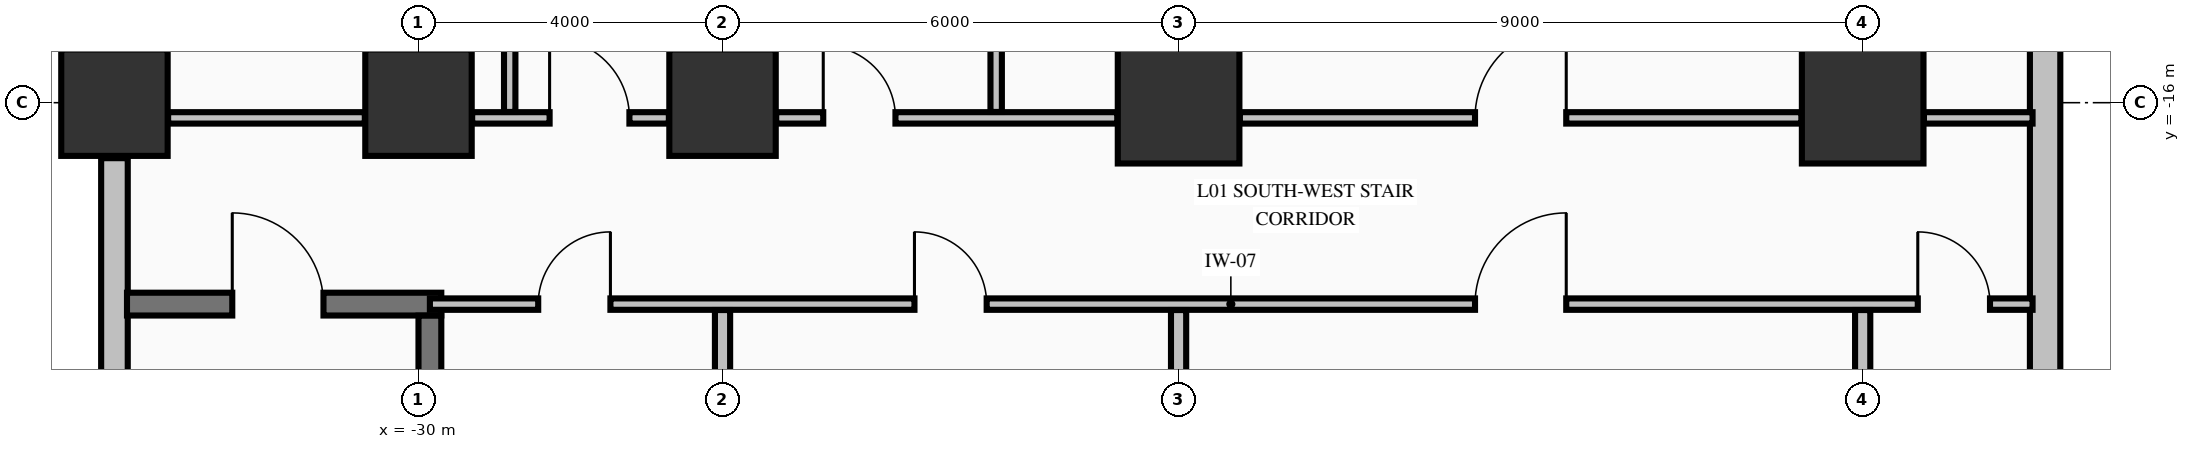
"""IFC4 building model, lengths in metres.
Left out: names, types, materials, properties, quantities, classifications, styles, units other than length and angle.
Written with IfcOpenShell. Run it as: python <this file> out.ifc"""

import sys

from ifc_helpers import new_model, si_unit, direction, frame, frame_2d, origin, origin_2d, place, context, subcontext, project, spatial, rectangle, extrude, element, fill, save


model = new_model("IFC4")
c1 = context("Model", 3, precision=1e-05, world=origin(), true_north=direction((0.0, 1.0)))
c2 = subcontext(c1, "Body", "Model", "MODEL_VIEW")
j1 = project(units=[si_unit("LENGTHUNIT", "METRE"), si_unit("PLANEANGLEUNIT", "RADIAN")], contexts=[c1])
p1 = place(None, origin())
s1 = spatial("IfcSite", under=j1, at=p1, CompositionType="ELEMENT")
p2 = place(p1, origin())
s2 = spatial("IfcBuilding", under=s1, at=p2, CompositionType="ELEMENT")
p3 = place(p2, frame((0.0, 0.0, 5.44)))
s3 = spatial("IfcBuildingStorey", under=s2, at=p3, CompositionType="ELEMENT", Elevation=5.44)
for number, where, z_axis, x_axis in (
    (1, (-34.0, -16.0, 0.0), (0.0, 0.0, 1.0), (1.0, 0.0, 0.0)),
    (2, (-30.0, -16.0, 0.0), (0.0, 0.0, 1.0), (1.0, 0.0, 0.0)),
    (3, (-26.0, -16.0, 0.0), (0.0, 0.0, 1.0), (1.0, 0.0, 0.0)),
):
    element("IfcColumn", number, at=place(p3, frame(where, z_axis=z_axis, x_axis=x_axis)), inside=s3, PredefinedType="COLUMN", context=c2, shape_type="SweptSolid", body=[
        extrude(rectangle(XDim=1.4, YDim=1.4, at=origin_2d()), origin(), (0.0, 0.0, 1.0), 5.09),
    ])
for number, where, z_axis, x_axis in (
    (4, (-20.0, -16.0, 0.0), (0.0, 0.0, 1.0), (1.0, 0.0, 0.0)),
    (5, (-11.0, -16.0, 0.0), (0.0, 0.0, 1.0), (1.0, 0.0, 0.0)),
):
    element("IfcColumn", number, at=place(p3, frame(where, z_axis=z_axis, x_axis=x_axis)), inside=s3, PredefinedType="COLUMN", context=c2, shape_type="SweptSolid", body=[
        extrude(rectangle(XDim=1.6, YDim=1.6, at=origin_2d()), origin(), (0.0, 0.0, 1.0), 5.09),
    ])
p4 = place(p3, frame((-34.0, -21.27, 0.0), z_axis=(0.0, 0.0, 1.0), x_axis=(0.0, 1.0, 0.0)))
e6 = element("IfcWall", 6, at=p4, inside=s3, PredefinedType="STANDARD", context=c2, shape_type="SweptSolid", body=[
    extrude(rectangle(XDim=4.54, YDim=0.35, at=frame_2d((2.27, 0.0))), origin(), (0.0, 0.0, 1.0), 5.09),
])
p5 = place(p3, frame((-8.6, -25.37, 0.0), z_axis=(0.0, 0.0, 1.0), x_axis=(0.0, 1.0, 0.0)))
e7 = element("IfcWall", 7, at=p5, inside=s3, PredefinedType="STANDARD", context=c2, shape_type="SweptSolid", body=[
    extrude(rectangle(XDim=24.72, YDim=0.4, at=frame_2d((12.36, 0.0))), origin(), (0.0, 0.0, 1.0), 4.132),
])
p6 = place(p3, frame((-33.835, -18.65, 0.0), z_axis=(0.0, 0.0, 1.0), x_axis=(1.0, 0.0, 0.0)))
e8 = element("IfcWall", 8, at=p6, inside=s3, PredefinedType="SHEAR", context=c2, shape_type="SweptSolid", body=[
    extrude(rectangle(XDim=4.135, YDim=0.3, at=frame_2d((2.067, 0.0))), origin(), (0.0, 0.0, 1.0), 5.09),
])
p7 = place(p6, frame((1.385, 0.0, 0.0)))
e9 = element("IfcOpeningElement", 9, at=p7, cuts=e8, PredefinedType="OPENING", context=c2, shape_type="SweptSolid", body=[
    extrude(rectangle(XDim=1.2, YDim=2.15, at=frame_2d((0.6, 1.075))), frame((0.0, 0.16, 0.0), z_axis=(0.0, -1.0, 0.0), x_axis=(1.0, 0.0, 0.0)), (0.0, 0.0, 1.0), 0.32),
])
p8 = place(p3, frame((-29.85, -18.65, 0.0), z_axis=(0.0, 0.0, 1.0), x_axis=(1.0, 0.0, 0.0)))
e10 = element("IfcWall", 10, at=p8, inside=s3, PredefinedType="PARTITIONING", context=c2, shape_type="SweptSolid", body=[
    extrude(rectangle(XDim=21.085, YDim=0.15, at=frame_2d((10.542, 0.0))), origin(), (0.0, 0.0, 1.0), 5.09),
])
p9 = place(p8, frame((1.425, 0.0, 0.0)))
e11 = element("IfcOpeningElement", 11, at=p9, cuts=e10, PredefinedType="OPENING", context=c2, shape_type="SweptSolid", body=[
    extrude(rectangle(XDim=0.95, YDim=2.15, at=frame_2d((0.475, 1.075))), frame((0.0, 0.085, 0.0), z_axis=(0.0, -1.0, 0.0), x_axis=(1.0, 0.0, 0.0)), (0.0, 0.0, 1.0), 0.17),
])
p10 = place(p8, frame((6.375, 0.0, 0.0)))
e12 = element("IfcOpeningElement", 12, at=p10, cuts=e10, PredefinedType="OPENING", context=c2, shape_type="SweptSolid", body=[
    extrude(rectangle(XDim=0.95, YDim=2.15, at=frame_2d((0.475, 1.075))), frame((0.0, 0.085, 0.0), z_axis=(0.0, -1.0, 0.0), x_axis=(1.0, 0.0, 0.0)), (0.0, 0.0, 1.0), 0.17),
])
p11 = place(p8, frame((13.75, 0.0, 0.0)))
e13 = element("IfcOpeningElement", 13, at=p11, cuts=e10, PredefinedType="OPENING", context=c2, shape_type="SweptSolid", body=[
    extrude(rectangle(XDim=1.2, YDim=2.15, at=frame_2d((0.6, 1.075))), frame((0.0, 0.085, 0.0), z_axis=(0.0, -1.0, 0.0), x_axis=(1.0, 0.0, 0.0)), (0.0, 0.0, 1.0), 0.17),
])
p12 = place(p8, frame((19.575, 0.0, 0.0)))
e14 = element("IfcOpeningElement", 14, at=p12, cuts=e10, PredefinedType="OPENING", context=c2, shape_type="SweptSolid", body=[
    extrude(rectangle(XDim=0.95, YDim=2.15, at=frame_2d((0.475, 1.075))), frame((0.0, 0.085, 0.0), z_axis=(0.0, -1.0, 0.0), x_axis=(1.0, 0.0, 0.0)), (0.0, 0.0, 1.0), 0.17),
])
p13 = place(p3, frame((-33.294, -16.2, 0.0), z_axis=(0.0, 0.0, 1.0), x_axis=(1.0, 0.0, 0.0)))
e15 = element("IfcWall", 15, at=p13, inside=s3, PredefinedType="PARTITIONING", context=c2, shape_type="SweptSolid", body=[
    extrude(rectangle(XDim=2.588, YDim=0.15, at=frame_2d((1.294, 0.0))), origin(), (0.0, 0.0, 1.0), 4.132),
])
p14 = place(p3, frame((-29.294, -16.2, 0.0), z_axis=(0.0, 0.0, 1.0), x_axis=(1.0, 0.0, 0.0)))
e16 = element("IfcWall", 16, at=p14, inside=s3, PredefinedType="PARTITIONING", context=c2, shape_type="SweptSolid", body=[
    extrude(rectangle(XDim=2.588, YDim=0.15, at=frame_2d((1.294, 0.0))), origin(), (0.0, 0.0, 1.0), 4.132),
])
p15 = place(p14, frame((1.019, 0.0, 0.0)))
e17 = element("IfcOpeningElement", 17, at=p15, cuts=e16, PredefinedType="OPENING", context=c2, shape_type="SweptSolid", body=[
    extrude(rectangle(XDim=1.05, YDim=2.15, at=frame_2d((0.525, 1.075))), frame((0.0, 0.085, 0.0), z_axis=(0.0, -1.0, 0.0), x_axis=(1.0, 0.0, 0.0)), (0.0, 0.0, 1.0), 0.17),
])
p16 = place(p3, frame((-25.294, -16.2, 0.0), z_axis=(0.0, 0.0, 1.0), x_axis=(1.0, 0.0, 0.0)))
e18 = element("IfcWall", 18, at=p16, inside=s3, PredefinedType="PARTITIONING", context=c2, shape_type="SweptSolid", body=[
    extrude(rectangle(XDim=4.488, YDim=0.15, at=frame_2d((2.244, 0.0))), origin(), (0.0, 0.0, 1.0), 4.132),
])
p17 = place(p16, frame((0.619, 0.0, 0.0)))
e19 = element("IfcOpeningElement", 19, at=p17, cuts=e18, PredefinedType="OPENING", context=c2, shape_type="SweptSolid", body=[
    extrude(rectangle(XDim=0.95, YDim=2.15, at=frame_2d((0.475, 1.075))), frame((0.0, 0.085, 0.0), z_axis=(0.0, -1.0, 0.0), x_axis=(1.0, 0.0, 0.0)), (0.0, 0.0, 1.0), 0.17),
])
p18 = place(p3, frame((-19.194, -16.2, 0.0), z_axis=(0.0, 0.0, 1.0), x_axis=(1.0, 0.0, 0.0)))
e20 = element("IfcWall", 20, at=p18, inside=s3, PredefinedType="PARTITIONING", context=c2, shape_type="SweptSolid", body=[
    extrude(rectangle(XDim=7.388, YDim=0.15, at=frame_2d((3.694, 0.0))), origin(), (0.0, 0.0, 1.0), 4.132),
])
p19 = place(p18, frame((3.094, 0.0, 0.0)))
e21 = element("IfcOpeningElement", 21, at=p19, cuts=e20, PredefinedType="OPENING", context=c2, shape_type="SweptSolid", body=[
    extrude(rectangle(XDim=1.2, YDim=2.15, at=frame_2d((0.6, 1.075))), frame((0.0, 0.085, 0.0), z_axis=(0.0, -1.0, 0.0), x_axis=(1.0, 0.0, 0.0)), (0.0, 0.0, 1.0), 0.17),
])
p20 = place(p3, frame((-10.194, -16.2, 0.0), z_axis=(0.0, 0.0, 1.0), x_axis=(1.0, 0.0, 0.0)))
e22 = element("IfcWall", 22, at=p20, inside=s3, PredefinedType="PARTITIONING", context=c2, shape_type="SweptSolid", body=[
    extrude(rectangle(XDim=1.429, YDim=0.15, at=frame_2d((0.715, 0.0))), origin(), (0.0, 0.0, 1.0), 5.09),
])
p21 = place(p3, frame((-29.85, -28.296, 0.0), z_axis=(0.0, 0.0, 1.0), x_axis=(0.0, 1.0, 0.0)))
e23 = element("IfcWall", 23, at=p21, inside=s3, PredefinedType="SHEAR", context=c2, shape_type="SweptSolid", body=[
    extrude(rectangle(XDim=9.494, YDim=0.3, at=frame_2d((4.747, 0.0))), origin(), (0.0, 0.0, 1.0), 5.09),
])
p22 = place(p3, frame((-28.8, -16.122, 0.0), z_axis=(0.0, 0.0, 1.0), x_axis=(0.0, 1.0, 0.0)))
e24 = element("IfcWall", 24, at=p22, inside=s3, PredefinedType="PARTITIONING", context=c2, shape_type="SweptSolid", body=[
    extrude(rectangle(XDim=7.019, YDim=0.15, at=frame_2d((3.51, 0.0))), origin(), (0.0, 0.0, 1.0), 5.09),
])
p23 = place(p22, frame((2.997, 0.0, 0.0)))
e25 = element("IfcOpeningElement", 25, at=p23, cuts=e24, PredefinedType="OPENING", context=c2, shape_type="SweptSolid", body=[
    extrude(rectangle(XDim=1.05, YDim=2.15, at=frame_2d((0.525, 1.075))), frame((0.0, 0.085, 0.0), z_axis=(0.0, -1.0, 0.0), x_axis=(1.0, 0.0, 0.0)), (0.0, 0.0, 1.0), 0.17),
])
p24 = place(p3, frame((-26.0, -21.294, 0.0), z_axis=(0.0, 0.0, 1.0), x_axis=(0.0, 1.0, 0.0)))
e26 = element("IfcWall", 26, at=p24, inside=s3, PredefinedType="PARTITIONING", context=c2, shape_type="SweptSolid", body=[
    extrude(rectangle(XDim=2.566, YDim=0.2, at=frame_2d((1.283, 0.0))), origin(), (0.0, 0.0, 1.0), 4.132),
])
p25 = place(p3, frame((-22.4, -16.122, 0.0), z_axis=(0.0, 0.0, 1.0), x_axis=(0.0, 1.0, 0.0)))
e27 = element("IfcWall", 27, at=p25, inside=s3, PredefinedType="PARTITIONING", context=c2, shape_type="SweptSolid", body=[
    extrude(rectangle(XDim=6.069, YDim=0.15, at=frame_2d((3.035, 0.0))), origin(), (0.0, 0.0, 1.0), 5.09),
])
for number, where, z_axis, x_axis in (
    (28, (-20.0, -21.194, 0.0), (0.0, 0.0, 1.0), (0.0, 1.0, 0.0)),
    (29, (-11.0, -21.194, 0.0), (0.0, 0.0, 1.0), (0.0, 1.0, 0.0)),
):
    element("IfcWall", number, at=place(p3, frame(where, z_axis=z_axis, x_axis=x_axis)), inside=s3, PredefinedType="PARTITIONING", context=c2, shape_type="SweptSolid", body=[
        extrude(rectangle(XDim=2.466, YDim=0.2, at=frame_2d((1.233, 0.0))), origin(), (0.0, 0.0, 1.0), 4.132),
    ])
p26 = place(p7, origin())
e30 = element("IfcDoor", 30, at=p26, inside=s3, OperationType="SINGLE_SWING_LEFT", PredefinedType="DOOR", context=c2, shape_type="SweptSolid", body=[
    extrude(rectangle(XDim=1.2, YDim=2.15, at=frame_2d((0.6, 1.075))), frame((0.0, 0.025, 0.0), z_axis=(0.0, -1.0, 0.0), x_axis=(1.0, 0.0, 0.0)), (0.0, 0.0, 1.0), 0.05),
])
fill(e9, e30)
p27 = place(p17, origin())
e31 = element("IfcDoor", 31, at=p27, inside=s3, OperationType="SINGLE_SWING_LEFT", PredefinedType="DOOR", context=c2, shape_type="SweptSolid", body=[
    extrude(rectangle(XDim=0.95, YDim=2.15, at=frame_2d((0.475, 1.075))), frame((0.0, 0.025, 0.0), z_axis=(0.0, -1.0, 0.0), x_axis=(1.0, 0.0, 0.0)), (0.0, 0.0, 1.0), 0.05),
])
fill(e19, e31)
p28 = place(p19, origin())
e32 = element("IfcDoor", 32, at=p28, inside=s3, OperationType="SINGLE_SWING_RIGHT", PredefinedType="DOOR", context=c2, shape_type="SweptSolid", body=[
    extrude(rectangle(XDim=1.2, YDim=2.15, at=frame_2d((0.6, 1.075))), frame((0.0, 0.025, 0.0), z_axis=(0.0, -1.0, 0.0), x_axis=(1.0, 0.0, 0.0)), (0.0, 0.0, 1.0), 0.05),
])
fill(e21, e32)
p29 = place(p15, origin())
e33 = element("IfcDoor", 33, at=p29, inside=s3, OperationType="SINGLE_SWING_LEFT", PredefinedType="DOOR", context=c2, shape_type="SweptSolid", body=[
    extrude(rectangle(XDim=1.05, YDim=2.15, at=frame_2d((0.525, 1.075))), frame((0.0, 0.025, 0.0), z_axis=(0.0, -1.0, 0.0), x_axis=(1.0, 0.0, 0.0)), (0.0, 0.0, 1.0), 0.05),
])
fill(e17, e33)
p30 = place(p9, origin())
e34 = element("IfcDoor", 34, at=p30, inside=s3, OperationType="SINGLE_SWING_RIGHT", PredefinedType="DOOR", context=c2, shape_type="SweptSolid", body=[
    extrude(rectangle(XDim=0.95, YDim=2.15, at=frame_2d((0.475, 1.075))), frame((0.0, 0.025, 0.0), z_axis=(0.0, -1.0, 0.0), x_axis=(1.0, 0.0, 0.0)), (0.0, 0.0, 1.0), 0.05),
])
fill(e11, e34)
p31 = place(p10, origin())
e35 = element("IfcDoor", 35, at=p31, inside=s3, OperationType="SINGLE_SWING_LEFT", PredefinedType="DOOR", context=c2, shape_type="SweptSolid", body=[
    extrude(rectangle(XDim=0.95, YDim=2.15, at=frame_2d((0.475, 1.075))), frame((0.0, 0.025, 0.0), z_axis=(0.0, -1.0, 0.0), x_axis=(1.0, 0.0, 0.0)), (0.0, 0.0, 1.0), 0.05),
])
fill(e12, e35)
p32 = place(p11, origin())
e36 = element("IfcDoor", 36, at=p32, inside=s3, OperationType="SINGLE_SWING_RIGHT", PredefinedType="DOOR", context=c2, shape_type="SweptSolid", body=[
    extrude(rectangle(XDim=1.2, YDim=2.15, at=frame_2d((0.6, 1.075))), frame((0.0, 0.025, 0.0), z_axis=(0.0, -1.0, 0.0), x_axis=(1.0, 0.0, 0.0)), (0.0, 0.0, 1.0), 0.05),
])
fill(e13, e36)
p33 = place(p12, origin())
e37 = element("IfcDoor", 37, at=p33, inside=s3, OperationType="SINGLE_SWING_LEFT", PredefinedType="DOOR", context=c2, shape_type="SweptSolid", body=[
    extrude(rectangle(XDim=0.95, YDim=2.15, at=frame_2d((0.475, 1.075))), frame((0.0, 0.025, 0.0), z_axis=(0.0, -1.0, 0.0), x_axis=(1.0, 0.0, 0.0)), (0.0, 0.0, 1.0), 0.05),
])
fill(e14, e37)
save(model, sys.argv[1])
